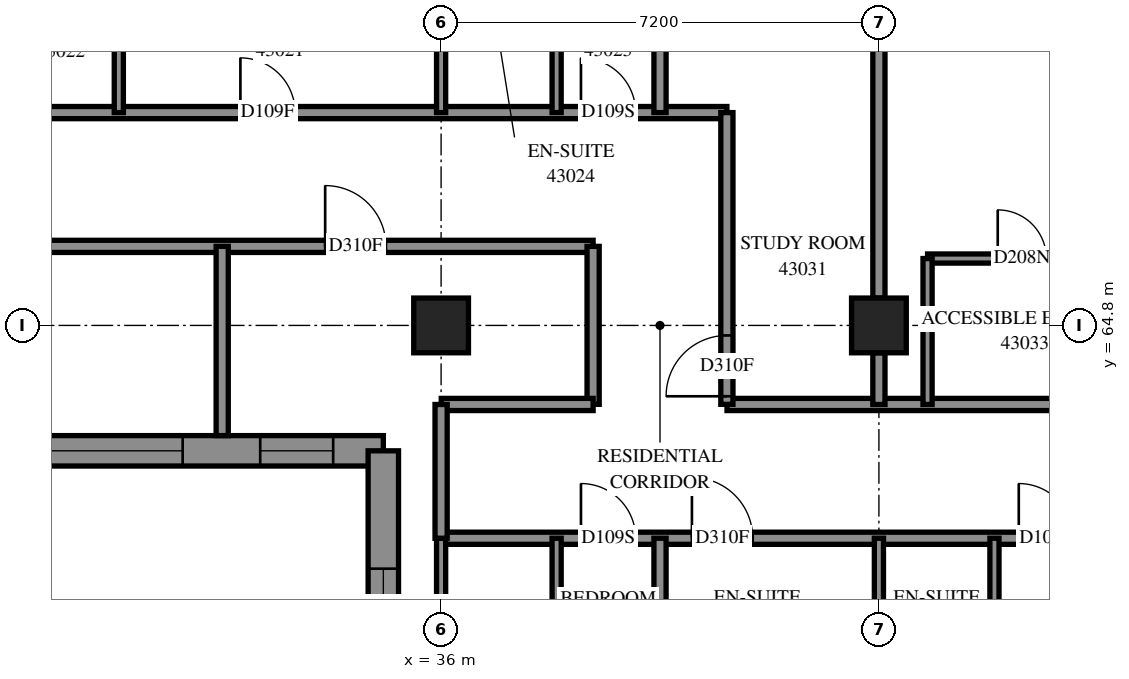
"""IFC4 building model, lengths in metres.
Left out: names, types, materials, properties, quantities, classifications, styles, units other than length and angle.
Written with IfcOpenShell. Run it as: python <this file> out.ifc"""

import sys

from ifc_helpers import new_model, si_unit, direction, frame, frame_2d, origin, origin_2d, place, context, subcontext, project, spatial, polyline, rectangle, outline, extrude, element, fill, save


model = new_model("IFC4")
c1 = context("Model", 3, precision=1e-05, world=origin(), true_north=direction((0.0, 1.0)))
c2 = subcontext(c1, "Body", "Model", "MODEL_VIEW")
j1 = project(units=[si_unit("LENGTHUNIT", "METRE"), si_unit("PLANEANGLEUNIT", "RADIAN")], contexts=[c1])
p1 = place(None, origin())
s1 = spatial("IfcSite", under=j1, at=p1, CompositionType="ELEMENT")
p2 = place(p1, origin())
s2 = spatial("IfcBuilding", under=s1, at=p2, CompositionType="ELEMENT")
p3 = place(p2, frame((0.0, 0.0, 159.2)))
s3 = spatial("IfcBuildingStorey", under=s2, at=p3, CompositionType="ELEMENT", Elevation=159.2)
for number, where, z_axis, x_axis in (
    (1, (36.0, 64.8, 0.0), (0.0, 0.0, 1.0), (1.0, 0.0, 0.0)),
    (2, (43.2, 64.8, 0.0), (0.0, 0.0, 1.0), (1.0, 0.0, 0.0)),
):
    element("IfcColumn", number, at=place(p3, frame(where, z_axis=z_axis, x_axis=x_axis)), inside=s3, PredefinedType="COLUMN", context=c2, shape_type="SweptSolid", body=[
        extrude(rectangle(XDim=0.9, YDim=0.9, at=origin_2d()), origin(), (0.0, 0.0, 1.0), 3.1),
    ])
p4 = place(p3, frame((19.538, 62.738, 0.0), z_axis=(0.0, 0.0, 1.0), x_axis=(1.0, 0.0, 0.0)))
e3 = element("IfcWall", 3, at=p4, inside=s3, PredefinedType="SOLIDWALL", context=c2, shape_type="SweptSolid", body=[
    extrude(outline(polyline([(-0.25, -0.25), (15.262, -0.25), (15.762, 0.25), (0.25, 0.25), (-0.25, -0.25)])), origin(), (0.0, 0.0, 1.0), 3.1),
])
p5 = place(p4, frame((2.462, 0.0, 0.45)))
e4 = element("IfcOpeningElement", 4, at=p5, cuts=e3, PredefinedType="OPENING", context=c2, shape_type="SweptSolid", body=[
    extrude(rectangle(XDim=2.8, YDim=2.5, at=frame_2d((1.4, 1.25))), frame((0.0, 0.26, 0.0), z_axis=(0.0, -1.0, 0.0), x_axis=(1.0, 0.0, 0.0)), (0.0, 0.0, 1.0), 0.52),
])
p6 = place(p4, frame((6.062, 0.0, 0.45)))
e5 = element("IfcOpeningElement", 5, at=p6, cuts=e3, PredefinedType="OPENING", context=c2, shape_type="SweptSolid", body=[
    extrude(rectangle(XDim=2.8, YDim=2.5, at=frame_2d((1.4, 1.25))), frame((0.0, 0.26, 0.0), z_axis=(0.0, -1.0, 0.0), x_axis=(1.0, 0.0, 0.0)), (0.0, 0.0, 1.0), 0.52),
])
p7 = place(p4, frame((9.412, 0.0, 0.45)))
e6 = element("IfcOpeningElement", 6, at=p7, cuts=e3, PredefinedType="OPENING", context=c2, shape_type="SweptSolid", body=[
    extrude(rectangle(XDim=2.8, YDim=2.5, at=frame_2d((1.4, 1.25))), frame((0.0, 0.26, 0.0), z_axis=(0.0, -1.0, 0.0), x_axis=(1.0, 0.0, 0.0)), (0.0, 0.0, 1.0), 0.52),
])
p8 = place(p4, frame((0.656, 0.0, 0.45)))
e7 = element("IfcOpeningElement", 7, at=p8, cuts=e3, PredefinedType="OPENING", context=c2, shape_type="SweptSolid", body=[
    extrude(rectangle(XDim=1.2, YDim=2.5, at=frame_2d((0.6, 1.25))), frame((0.0, 0.26, 0.0), z_axis=(0.0, -1.0, 0.0), x_axis=(1.0, 0.0, 0.0)), (0.0, 0.0, 1.0), 0.52),
])
p9 = place(p4, frame((13.487, 0.0, 0.45)))
e8 = element("IfcOpeningElement", 8, at=p9, cuts=e3, PredefinedType="OPENING", context=c2, shape_type="SweptSolid", body=[
    extrude(rectangle(XDim=1.2, YDim=2.5, at=frame_2d((0.6, 1.25))), frame((0.0, 0.26, 0.0), z_axis=(0.0, -1.0, 0.0), x_axis=(1.0, 0.0, 0.0)), (0.0, 0.0, 1.0), 0.52),
])
p10 = place(p3, frame((35.05, 62.738, 0.0), z_axis=(0.0, 0.0, 1.0), x_axis=(0.0, -1.0, 0.0)))
e9 = element("IfcWall", 9, at=p10, inside=s3, PredefinedType="SOLIDWALL", context=c2, shape_type="SweptSolid", body=[
    extrude(outline(polyline([(0.25, -0.25), (6.338, -0.25), (5.838, 0.25), (-0.25, 0.25), (0.25, -0.25)])), origin(), (0.0, 0.0, 1.0), 3.1),
])
p11 = place(p10, frame((1.938, 0.0, 0.7)))
e10 = element("IfcOpeningElement", 10, at=p11, cuts=e9, PredefinedType="OPENING", context=c2, shape_type="SweptSolid", body=[
    extrude(rectangle(XDim=1.8, YDim=2.2, at=frame_2d((0.9, 1.1))), frame((0.0, 0.26, 0.0), z_axis=(0.0, -1.0, 0.0), x_axis=(1.0, 0.0, 0.0)), (0.0, 0.0, 1.0), 0.52),
])
p12 = place(p10, frame((3.938, 0.0, 0.45)))
e11 = element("IfcOpeningElement", 11, at=p12, cuts=e9, PredefinedType="OPENING", context=c2, shape_type="SweptSolid", body=[
    extrude(rectangle(XDim=0.8, YDim=2.5, at=frame_2d((0.4, 1.25))), frame((0.0, 0.26, 0.0), z_axis=(0.0, -1.0, 0.0), x_axis=(1.0, 0.0, 0.0)), (0.0, 0.0, 1.0), 0.52),
])
p13 = place(p3, frame((21.6, 68.3, 0.0), z_axis=(0.0, 0.0, 1.0), x_axis=(1.0, 0.0, 0.0)))
e12 = element("IfcWall", 12, at=p13, inside=s3, PredefinedType="PARTITIONING", context=c2, shape_type="SweptSolid", body=[
    extrude(rectangle(XDim=19.1, YDim=0.2, at=frame_2d((9.55, 0.0))), origin(), (0.0, 0.0, 1.0), 3.1),
])
p14 = place(p13, frame((3.899, 0.0, 0.0)))
e13 = element("IfcOpeningElement", 13, at=p14, cuts=e12, PredefinedType="OPENING", context=c2, shape_type="SweptSolid", body=[
    extrude(rectangle(XDim=0.9, YDim=2.1, at=frame_2d((0.45, 1.05))), frame((0.0, 0.11, 0.0), z_axis=(0.0, -1.0, 0.0), x_axis=(1.0, 0.0, 0.0)), (0.0, 0.0, 1.0), 0.22),
])
p15 = place(p13, frame((11.099, 0.0, 0.0)))
e14 = element("IfcOpeningElement", 14, at=p15, cuts=e12, PredefinedType="OPENING", context=c2, shape_type="SweptSolid", body=[
    extrude(rectangle(XDim=0.9, YDim=2.1, at=frame_2d((0.45, 1.05))), frame((0.0, 0.11, 0.0), z_axis=(0.0, -1.0, 0.0), x_axis=(1.0, 0.0, 0.0)), (0.0, 0.0, 1.0), 0.22),
])
p16 = place(p13, frame((16.7, 0.0, 0.0)))
e15 = element("IfcOpeningElement", 15, at=p16, cuts=e12, PredefinedType="OPENING", context=c2, shape_type="SweptSolid", body=[
    extrude(rectangle(XDim=0.9, YDim=2.1, at=frame_2d((0.45, 1.05))), frame((0.0, 0.11, 0.0), z_axis=(0.0, -1.0, 0.0), x_axis=(1.0, 0.0, 0.0)), (0.0, 0.0, 1.0), 0.22),
])
p17 = place(p3, frame((21.6, 66.1, 0.0), z_axis=(0.0, 0.0, 1.0), x_axis=(1.0, 0.0, 0.0)))
e16 = element("IfcWall", 16, at=p17, inside=s3, PredefinedType="PARTITIONING", context=c2, shape_type="SweptSolid", body=[
    extrude(rectangle(XDim=16.9, YDim=0.2, at=frame_2d((8.45, 0.0))), origin(), (0.0, 0.0, 1.0), 3.1),
])
p18 = place(p17, frame((12.493, 0.0, 0.0)))
e17 = element("IfcOpeningElement", 17, at=p18, cuts=e16, PredefinedType="OPENING", context=c2, shape_type="SweptSolid", body=[
    extrude(rectangle(XDim=1.0, YDim=2.1, at=frame_2d((0.5, 1.05))), frame((0.0, 0.11, 0.0), z_axis=(0.0, -1.0, 0.0), x_axis=(1.0, 0.0, 0.0)), (0.0, 0.0, 1.0), 0.22),
])
p19 = place(p3, frame((36.0, 61.3, 0.0), z_axis=(0.0, 0.0, 1.0), x_axis=(1.0, 0.0, 0.0)))
e18 = element("IfcWall", 18, at=p19, inside=s3, PredefinedType="PARTITIONING", context=c2, shape_type="SweptSolid", body=[
    extrude(rectangle(XDim=16.9, YDim=0.2, at=frame_2d((8.45, 0.0))), origin(), (0.0, 0.0, 1.0), 3.1),
])
p20 = place(p19, frame((2.3, 0.0, 0.0)))
e19 = element("IfcOpeningElement", 19, at=p20, cuts=e18, PredefinedType="OPENING", context=c2, shape_type="SweptSolid", body=[
    extrude(rectangle(XDim=0.9, YDim=2.1, at=frame_2d((0.45, 1.05))), frame((0.0, 0.11, 0.0), z_axis=(0.0, -1.0, 0.0), x_axis=(1.0, 0.0, 0.0)), (0.0, 0.0, 1.0), 0.22),
])
p21 = place(p19, frame((4.125, 0.0, 0.0)))
e20 = element("IfcOpeningElement", 20, at=p21, cuts=e18, PredefinedType="OPENING", context=c2, shape_type="SweptSolid", body=[
    extrude(rectangle(XDim=1.0, YDim=2.1, at=frame_2d((0.5, 1.05))), frame((0.0, 0.11, 0.0), z_axis=(0.0, -1.0, 0.0), x_axis=(1.0, 0.0, 0.0)), (0.0, 0.0, 1.0), 0.22),
])
p22 = place(p19, frame((9.5, 0.0, 0.0)))
e21 = element("IfcOpeningElement", 21, at=p22, cuts=e18, PredefinedType="OPENING", context=c2, shape_type="SweptSolid", body=[
    extrude(rectangle(XDim=0.9, YDim=2.1, at=frame_2d((0.45, 1.05))), frame((0.0, 0.11, 0.0), z_axis=(0.0, -1.0, 0.0), x_axis=(1.0, 0.0, 0.0)), (0.0, 0.0, 1.0), 0.22),
])
p23 = place(p19, frame((11.325, 0.0, 0.0)))
e22 = element("IfcOpeningElement", 22, at=p23, cuts=e18, PredefinedType="OPENING", context=c2, shape_type="SweptSolid", body=[
    extrude(rectangle(XDim=1.0, YDim=2.1, at=frame_2d((0.5, 1.05))), frame((0.0, 0.11, 0.0), z_axis=(0.0, -1.0, 0.0), x_axis=(1.0, 0.0, 0.0)), (0.0, 0.0, 1.0), 0.22),
])
p24 = place(p19, frame((15.647, 0.0, 0.0)))
e23 = element("IfcOpeningElement", 23, at=p24, cuts=e18, PredefinedType="OPENING", context=c2, shape_type="SweptSolid", body=[
    extrude(rectangle(XDim=1.0, YDim=2.1, at=frame_2d((0.5, 1.05))), frame((0.0, 0.11, 0.0), z_axis=(0.0, -1.0, 0.0), x_axis=(1.0, 0.0, 0.0)), (0.0, 0.0, 1.0), 0.22),
])
p25 = place(p3, frame((40.702, 63.5, 0.0), z_axis=(0.0, 0.0, 1.0), x_axis=(1.0, 0.0, 0.0)))
e24 = element("IfcWall", 24, at=p25, inside=s3, PredefinedType="PARTITIONING", context=c2, shape_type="SweptSolid", body=[
    extrude(rectangle(XDim=14.198, YDim=0.2, at=frame_2d((7.099, 0.0))), origin(), (0.0, 0.0, 1.0), 3.1),
])
p26 = place(p25, frame((6.692, 0.0, 0.0)))
e25 = element("IfcOpeningElement", 25, at=p26, cuts=e24, PredefinedType="OPENING", context=c2, shape_type="SweptSolid", body=[
    extrude(rectangle(XDim=0.9, YDim=2.1, at=frame_2d((0.45, 1.05))), frame((0.0, 0.11, 0.0), z_axis=(0.0, -1.0, 0.0), x_axis=(1.0, 0.0, 0.0)), (0.0, 0.0, 1.0), 0.22),
])
p27 = place(p25, frame((10.25, 0.0, 0.0)))
e26 = element("IfcOpeningElement", 26, at=p27, cuts=e24, PredefinedType="OPENING", context=c2, shape_type="SweptSolid", body=[
    extrude(rectangle(XDim=0.9, YDim=2.1, at=frame_2d((0.45, 1.05))), frame((0.0, 0.11, 0.0), z_axis=(0.0, -1.0, 0.0), x_axis=(1.0, 0.0, 0.0)), (0.0, 0.0, 1.0), 0.22),
])
p28 = place(p3, frame((43.2, 65.25, 0.0), z_axis=(0.0, 0.0, 1.0), x_axis=(0.0, 1.0, 0.0)))
e27 = element("IfcWall", 27, at=p28, inside=s3, PredefinedType="PARTITIONING", context=c2, shape_type="SweptSolid", body=[
    extrude(rectangle(XDim=6.3, YDim=0.2, at=frame_2d((3.15, 0.0))), origin(), (0.0, 0.0, 1.0), 3.1),
])
p29 = place(p3, frame((40.7, 63.502, 0.0), z_axis=(0.0, 0.0, 1.0), x_axis=(0.0, 1.0, 0.0)))
e28 = element("IfcWall", 28, at=p29, inside=s3, PredefinedType="PARTITIONING", context=c2, shape_type="SweptSolid", body=[
    extrude(rectangle(XDim=4.798, YDim=0.2, at=frame_2d((2.399, 0.0))), origin(), (0.0, 0.0, 1.0), 3.1),
])
p30 = place(p29, frame((0.133, 0.0, 0.0)))
e29 = element("IfcOpeningElement", 29, at=p30, cuts=e28, PredefinedType="OPENING", context=c2, shape_type="SweptSolid", body=[
    extrude(rectangle(XDim=1.0, YDim=2.1, at=frame_2d((0.5, 1.05))), frame((0.0, 0.11, 0.0), z_axis=(0.0, -1.0, 0.0), x_axis=(1.0, 0.0, 0.0)), (0.0, 0.0, 1.0), 0.22),
])
p31 = place(p3, frame((39.6, 68.3, 0.0), z_axis=(0.0, 0.0, 1.0), x_axis=(0.0, 1.0, 0.0)))
e30 = element("IfcWall", 30, at=p31, inside=s3, PredefinedType="PARTITIONING", context=c2, shape_type="SweptSolid", body=[
    extrude(rectangle(XDim=4.569, YDim=0.2, at=frame_2d((2.284, 0.0))), origin(), (0.0, 0.0, 1.0), 3.1),
])
p32 = place(p3, frame((39.6, 56.9, 0.0), z_axis=(0.0, 0.0, 1.0), x_axis=(0.0, 1.0, 0.0)))
e31 = element("IfcWall", 31, at=p32, inside=s3, PredefinedType="PARTITIONING", context=c2, shape_type="SweptSolid", body=[
    extrude(rectangle(XDim=4.4, YDim=0.2, at=frame_2d((2.2, 0.0))), origin(), (0.0, 0.0, 1.0), 3.1),
])
p33 = place(p3, frame((44.0, 65.9, 0.0), z_axis=(0.0, 0.0, 1.0), x_axis=(1.0, 0.0, 0.0)))
e32 = element("IfcWall", 32, at=p33, inside=s3, PredefinedType="PARTITIONING", context=c2, shape_type="SweptSolid", body=[
    extrude(rectangle(XDim=3.2, YDim=0.15, at=frame_2d((1.6, 0.0))), origin(), (0.0, 0.0, 1.0), 3.1),
])
p34 = place(p33, frame((1.154, 0.0, 0.0)))
e33 = element("IfcOpeningElement", 33, at=p34, cuts=e32, PredefinedType="OPENING", context=c2, shape_type="SweptSolid", body=[
    extrude(rectangle(XDim=0.8, YDim=2.1, at=frame_2d((0.4, 1.05))), frame((0.0, 0.085, 0.0), z_axis=(0.0, -1.0, 0.0), x_axis=(1.0, 0.0, 0.0)), (0.0, 0.0, 1.0), 0.17),
])
p35 = place(p3, frame((32.4, 62.988, 0.0), z_axis=(0.0, 0.0, 1.0), x_axis=(0.0, 1.0, 0.0)))
e34 = element("IfcWall", 34, at=p35, inside=s3, PredefinedType="PARTITIONING", context=c2, shape_type="SweptSolid", body=[
    extrude(rectangle(XDim=3.112, YDim=0.2, at=frame_2d((1.556, 0.0))), origin(), (0.0, 0.0, 1.0), 3.1),
])
p36 = place(p3, frame((38.5, 63.502, 0.0), z_axis=(0.0, 0.0, 1.0), x_axis=(0.0, 1.0, 0.0)))
e35 = element("IfcWall", 35, at=p36, inside=s3, PredefinedType="PARTITIONING", context=c2, shape_type="SweptSolid", body=[
    extrude(rectangle(XDim=2.598, YDim=0.2, at=frame_2d((1.299, 0.0))), origin(), (0.0, 0.0, 1.0), 3.1),
])
p37 = place(p3, frame((36.002, 63.5, 0.0), z_axis=(0.0, 0.0, 1.0), x_axis=(1.0, 0.0, 0.0)))
e36 = element("IfcWall", 36, at=p37, inside=s3, PredefinedType="PARTITIONING", context=c2, shape_type="SweptSolid", body=[
    extrude(rectangle(XDim=2.498, YDim=0.2, at=frame_2d((1.249, 0.0))), origin(), (0.0, 0.0, 1.0), 3.1),
])
for number, where, z_axis, x_axis in (
    (37, (30.7, 68.3, 0.0), (0.0, 0.0, 1.0), (0.0, 1.0, 0.0)),
    (38, (37.9, 68.3, 0.0), (0.0, 0.0, 1.0), (0.0, 1.0, 0.0)),
    (39, (36.0, 68.3, 0.0), (0.0, 0.0, 1.0), (0.0, 1.0, 0.0)),
    (40, (44.0, 63.5, 0.0), (0.0, 0.0, 1.0), (0.0, 1.0, 0.0)),
    (41, (37.9, 58.9, 0.0), (0.0, 0.0, 1.0), (0.0, 1.0, 0.0)),
):
    element("IfcWall", number, at=place(p3, frame(where, z_axis=z_axis, x_axis=x_axis)), inside=s3, PredefinedType="PARTITIONING", context=c2, shape_type="SweptSolid", body=[
        extrude(rectangle(XDim=2.4, YDim=0.15, at=frame_2d((1.2, 0.0))), origin(), (0.0, 0.0, 1.0), 3.1),
    ])
p38 = place(p3, frame((36.0, 58.9, 0.0), z_axis=(0.0, 0.0, 1.0), x_axis=(0.0, 1.0, 0.0)))
e42 = element("IfcWall", 42, at=p38, inside=s3, PredefinedType="PARTITIONING", context=c2, shape_type="SweptSolid", body=[
    extrude(rectangle(XDim=2.4, YDim=0.15, at=frame_2d((1.2, 0.0))), origin(), (0.0, 0.0, 1.0), 2.6),
])
for number, where, z_axis, x_axis in (
    (43, (45.1, 58.9, 0.0), (0.0, 0.0, 1.0), (0.0, 1.0, 0.0)),
    (44, (43.2, 58.9, 0.0), (0.0, 0.0, 1.0), (0.0, 1.0, 0.0)),
):
    element("IfcWall", number, at=place(p3, frame(where, z_axis=z_axis, x_axis=x_axis)), inside=s3, PredefinedType="PARTITIONING", context=c2, shape_type="SweptSolid", body=[
        extrude(rectangle(XDim=2.4, YDim=0.15, at=frame_2d((1.2, 0.0))), origin(), (0.0, 0.0, 1.0), 3.1),
    ])
p39 = place(p3, frame((36.0, 61.3, 0.0), z_axis=(0.0, 0.0, 1.0), x_axis=(0.0, 1.0, 0.0)))
e45 = element("IfcWall", 45, at=p39, inside=s3, PredefinedType="PARTITIONING", context=c2, shape_type="SweptSolid", body=[
    extrude(rectangle(XDim=2.2, YDim=0.2, at=frame_2d((1.1, 0.0))), origin(), (0.0, 0.0, 1.0), 2.6),
])
p40 = place(p3, frame((43.2, 63.5, 0.0), z_axis=(0.0, 0.0, 1.0), x_axis=(0.0, 1.0, 0.0)))
e46 = element("IfcWall", 46, at=p40, inside=s3, PredefinedType="PARTITIONING", context=c2, shape_type="SweptSolid", body=[
    extrude(rectangle(XDim=0.85, YDim=0.2, at=frame_2d((0.425, 0.0))), origin(), (0.0, 0.0, 1.0), 3.1),
])
p41 = place(p7, origin())
e47 = element("IfcWindow", 47, at=p41, inside=s3, PartitioningType="SINGLE_PANEL", PredefinedType="WINDOW", context=c2, shape_type="SweptSolid", body=[
    extrude(rectangle(XDim=2.8, YDim=2.5, at=frame_2d((1.4, 1.25))), frame((0.0, 0.18, 0.0), z_axis=(0.0, -1.0, 0.0), x_axis=(1.0, 0.0, 0.0)), (0.0, 0.0, 1.0), 0.06),
])
fill(e6, e47)
p42 = place(p9, origin())
e48 = element("IfcWindow", 48, at=p42, inside=s3, PartitioningType="SINGLE_PANEL", PredefinedType="WINDOW", context=c2, shape_type="SweptSolid", body=[
    extrude(rectangle(XDim=1.2, YDim=2.5, at=frame_2d((0.6, 1.25))), frame((0.0, 0.18, 0.0), z_axis=(0.0, -1.0, 0.0), x_axis=(1.0, 0.0, 0.0)), (0.0, 0.0, 1.0), 0.06),
])
fill(e8, e48)
p43 = place(p15, origin())
e49 = element("IfcDoor", 49, at=p43, inside=s3, OperationType="SINGLE_SWING_RIGHT", PredefinedType="DOOR", context=c2, shape_type="SweptSolid", body=[
    extrude(rectangle(XDim=0.9, YDim=2.1, at=frame_2d((0.45, 1.05))), frame((0.0, 0.025, 0.0), z_axis=(0.0, -1.0, 0.0), x_axis=(1.0, 0.0, 0.0)), (0.0, 0.0, 1.0), 0.05),
])
fill(e14, e49)
p44 = place(p16, origin())
e50 = element("IfcDoor", 50, at=p44, inside=s3, OperationType="SINGLE_SWING_RIGHT", PredefinedType="DOOR", context=c2, shape_type="SweptSolid", body=[
    extrude(rectangle(XDim=0.9, YDim=2.1, at=frame_2d((0.45, 1.05))), frame((0.0, 0.025, 0.0), z_axis=(0.0, -1.0, 0.0), x_axis=(1.0, 0.0, 0.0)), (0.0, 0.0, 1.0), 0.05),
])
fill(e15, e50)
p45 = place(p18, origin())
e51 = element("IfcDoor", 51, at=p45, inside=s3, OperationType="SINGLE_SWING_RIGHT", PredefinedType="DOOR", context=c2, shape_type="SweptSolid", body=[
    extrude(rectangle(XDim=1.0, YDim=2.1, at=frame_2d((0.5, 1.05))), frame((0.0, 0.025, 0.0), z_axis=(0.0, -1.0, 0.0), x_axis=(1.0, 0.0, 0.0)), (0.0, 0.0, 1.0), 0.05),
])
fill(e17, e51)
p46 = place(p20, origin())
e52 = element("IfcDoor", 52, at=p46, inside=s3, OperationType="SINGLE_SWING_LEFT", PredefinedType="DOOR", context=c2, shape_type="SweptSolid", body=[
    extrude(rectangle(XDim=0.9, YDim=2.1, at=frame_2d((0.45, 1.05))), frame((0.0, 0.025, 0.0), z_axis=(0.0, -1.0, 0.0), x_axis=(1.0, 0.0, 0.0)), (0.0, 0.0, 1.0), 0.05),
])
fill(e19, e52)
p47 = place(p21, origin())
e53 = element("IfcDoor", 53, at=p47, inside=s3, OperationType="SINGLE_SWING_RIGHT", PredefinedType="DOOR", context=c2, shape_type="SweptSolid", body=[
    extrude(rectangle(XDim=1.0, YDim=2.1, at=frame_2d((0.5, 1.05))), frame((0.0, 0.025, 0.0), z_axis=(0.0, -1.0, 0.0), x_axis=(1.0, 0.0, 0.0)), (0.0, 0.0, 1.0), 0.05),
])
fill(e20, e53)
p48 = place(p22, origin())
e54 = element("IfcDoor", 54, at=p48, inside=s3, OperationType="SINGLE_SWING_LEFT", PredefinedType="DOOR", context=c2, shape_type="SweptSolid", body=[
    extrude(rectangle(XDim=0.9, YDim=2.1, at=frame_2d((0.45, 1.05))), frame((0.0, 0.025, 0.0), z_axis=(0.0, -1.0, 0.0), x_axis=(1.0, 0.0, 0.0)), (0.0, 0.0, 1.0), 0.05),
])
fill(e21, e54)
p49 = place(p30, origin())
e55 = element("IfcDoor", 55, at=p49, inside=s3, OperationType="SINGLE_SWING_LEFT", PredefinedType="DOOR", context=c2, shape_type="SweptSolid", body=[
    extrude(rectangle(XDim=1.0, YDim=2.1, at=frame_2d((0.5, 1.05))), frame((0.0, 0.025, 0.0), z_axis=(0.0, -1.0, 0.0), x_axis=(1.0, 0.0, 0.0)), (0.0, 0.0, 1.0), 0.05),
])
fill(e29, e55)
p50 = place(p34, origin())
e56 = element("IfcDoor", 56, at=p50, inside=s3, OperationType="SINGLE_SWING_RIGHT", PredefinedType="DOOR", context=c2, shape_type="SweptSolid", body=[
    extrude(rectangle(XDim=0.8, YDim=2.1, at=frame_2d((0.4, 1.05))), frame((0.0, 0.025, 0.0), z_axis=(0.0, -1.0, 0.0), x_axis=(1.0, 0.0, 0.0)), (0.0, 0.0, 1.0), 0.05),
])
fill(e33, e56)
p51 = place(p11, origin())
e57 = element("IfcWindow", 57, at=p51, inside=s3, PartitioningType="SINGLE_PANEL", PredefinedType="WINDOW", context=c2, shape_type="SweptSolid", body=[
    extrude(rectangle(XDim=1.8, YDim=2.2, at=frame_2d((0.9, 1.1))), frame((0.0, 0.18, 0.0), z_axis=(0.0, -1.0, 0.0), x_axis=(1.0, 0.0, 0.0)), (0.0, 0.0, 1.0), 0.06),
])
fill(e10, e57)
save(model, sys.argv[1])
